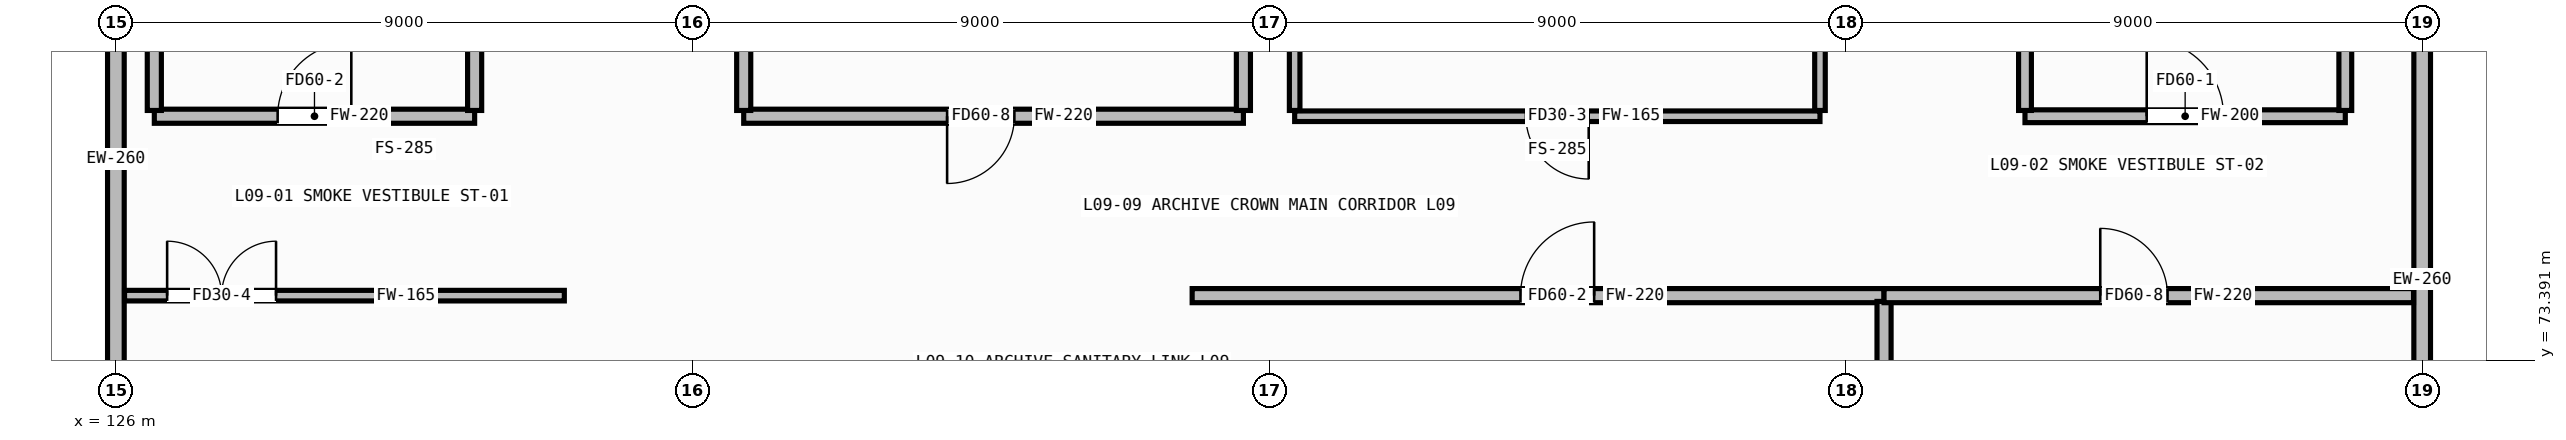
"""IFC4 building model, lengths in metres.
Left out: names, types, materials, properties, quantities, classifications, styles, units other than length and angle.
Written with IfcOpenShell. Run it as: python <this file> out.ifc"""

import sys

from ifc_helpers import new_model, si_unit, direction, frame, frame_2d, origin, place, context, subcontext, project, spatial, rectangle, extrude, element, fill, save


model = new_model("IFC4")
c1 = context("Model", 3, precision=1e-05, world=origin(), true_north=direction((0.0, 1.0)))
c2 = subcontext(c1, "Body", "Model", "MODEL_VIEW")
j1 = project(units=[si_unit("LENGTHUNIT", "METRE"), si_unit("PLANEANGLEUNIT", "RADIAN")], contexts=[c1])
p1 = place(None, origin())
s1 = spatial("IfcSite", under=j1, at=p1, CompositionType="ELEMENT")
p2 = place(p1, origin())
s2 = spatial("IfcBuilding", under=s1, at=p2, CompositionType="ELEMENT")
p3 = place(p2, frame((0.0, 0.0, 31.4)))
s3 = spatial("IfcBuildingStorey", under=s2, at=p3, CompositionType="ELEMENT", Elevation=31.4)
p4 = place(p3, frame((126.0, 72.25, 0.0), z_axis=(0.0, 0.0, 1.0), x_axis=(0.0, 1.0, 0.0)))
e1 = element("IfcWall", 1, at=p4, inside=s3, PredefinedType="STANDARD", context=c2, shape_type="SweptSolid", body=[
    extrude(rectangle(XDim=6.7, YDim=0.26, at=frame_2d((3.35, 0.0))), origin(), (0.0, 0.0, 1.0), 3.16),
])
p5 = place(p3, frame((162.0, 78.975, 0.0), z_axis=(0.0, 0.0, 1.0), x_axis=(0.0, -1.0, 0.0)))
e2 = element("IfcWall", 2, at=p5, inside=s3, PredefinedType="STANDARD", context=c2, shape_type="SweptSolid", body=[
    extrude(rectangle(XDim=6.75, YDim=0.26, at=frame_2d((3.375, 0.0))), origin(), (0.0, 0.0, 1.0), 3.16),
])
p6 = place(p3, frame((126.6, 77.2, 0.0), z_axis=(0.0, 0.0, 1.0), x_axis=(1.0, 0.0, 0.0)))
e3 = element("IfcWall", 3, at=p6, inside=s3, PredefinedType="PARTITIONING", context=c2, shape_type="SweptSolid", body=[
    extrude(rectangle(XDim=5.0, YDim=0.22, at=frame_2d((2.5, 0.0))), origin(), (0.0, 0.0, 1.0), 3.56),
])
p7 = place(p6, frame((1.925, 0.0, 0.0)))
e4 = element("IfcOpeningElement", 4, at=p7, cuts=e3, PredefinedType="OPENING", context=c2, shape_type="SweptSolid", body=[
    extrude(rectangle(XDim=1.15, YDim=2.1, at=frame_2d((0.575, 1.05))), frame((0.0, 0.122, 0.0), z_axis=(0.0, -1.0, 0.0), x_axis=(1.0, 0.0, 0.0)), (0.0, 0.0, 1.0), 0.244),
])
for number, where, z_axis, x_axis in (
    (5, (126.6, 77.29, 0.0), (0.0, 0.0, 1.0), (0.0, 1.0, 0.0)),
    (6, (131.6, 77.29, 0.0), (0.0, 0.0, 1.0), (0.0, 1.0, 0.0)),
):
    element("IfcWall", number, at=place(p3, frame(where, z_axis=z_axis, x_axis=x_axis)), inside=s3, PredefinedType="PARTITIONING", context=c2, shape_type="SweptSolid", body=[
        extrude(rectangle(XDim=3.82, YDim=0.22, at=frame_2d((1.91, 0.0))), origin(), (0.0, 0.0, 1.0), 3.56),
    ])
p8 = place(p3, frame((155.8, 77.2, 0.0), z_axis=(0.0, 0.0, 1.0), x_axis=(1.0, 0.0, 0.0)))
e7 = element("IfcWall", 7, at=p8, inside=s3, PredefinedType="PARTITIONING", context=c2, shape_type="SweptSolid", body=[
    extrude(rectangle(XDim=5.0, YDim=0.2, at=frame_2d((2.5, 0.0))), origin(), (0.0, 0.0, 1.0), 3.56),
])
p9 = place(p8, frame((1.9, 0.0, 0.0)))
e8 = element("IfcOpeningElement", 8, at=p9, cuts=e7, PredefinedType="OPENING", context=c2, shape_type="SweptSolid", body=[
    extrude(rectangle(XDim=1.2, YDim=2.1, at=frame_2d((0.6, 1.05))), frame((0.0, 0.112, 0.0), z_axis=(0.0, -1.0, 0.0), x_axis=(1.0, 0.0, 0.0)), (0.0, 0.0, 1.0), 0.224),
])
for number, where, z_axis, x_axis in (
    (9, (155.8, 77.29, 0.0), (0.0, 0.0, 1.0), (0.0, 1.0, 0.0)),
    (10, (160.8, 77.29, 0.0), (0.0, 0.0, 1.0), (0.0, 1.0, 0.0)),
):
    element("IfcWall", number, at=place(p3, frame(where, z_axis=z_axis, x_axis=x_axis)), inside=s3, PredefinedType="PARTITIONING", context=c2, shape_type="SweptSolid", body=[
        extrude(rectangle(XDim=3.82, YDim=0.2, at=frame_2d((1.91, 0.0))), origin(), (0.0, 0.0, 1.0), 3.56),
    ])
p10 = place(p3, frame((135.8, 77.2, 0.0), z_axis=(0.0, 0.0, 1.0), x_axis=(1.0, 0.0, 0.0)))
e11 = element("IfcWall", 11, at=p10, inside=s3, PredefinedType="PARTITIONING", context=c2, shape_type="SweptSolid", body=[
    extrude(rectangle(XDim=7.8, YDim=0.22, at=frame_2d((3.9, 0.0))), origin(), (0.0, 0.0, 1.0), 3.56),
])
p11 = place(p10, frame((3.175, 0.0, 0.0)))
e12 = element("IfcOpeningElement", 12, at=p11, cuts=e11, PredefinedType="OPENING", context=c2, shape_type="SweptSolid", body=[
    extrude(rectangle(XDim=1.05, YDim=2.02, at=frame_2d((0.525, 1.01))), frame((0.0, 0.122, 0.0), z_axis=(0.0, -1.0, 0.0), x_axis=(1.0, 0.0, 0.0)), (0.0, 0.0, 1.0), 0.244),
])
for number, where, z_axis, x_axis in (
    (13, (135.8, 77.29, 0.0), (0.0, 0.0, 1.0), (0.0, 1.0, 0.0)),
    (14, (143.6, 77.29, 0.0), (0.0, 0.0, 1.0), (0.0, 1.0, 0.0)),
):
    element("IfcWall", number, at=place(p3, frame(where, z_axis=z_axis, x_axis=x_axis)), inside=s3, PredefinedType="PARTITIONING", context=c2, shape_type="SweptSolid", body=[
        extrude(rectangle(XDim=3.82, YDim=0.22, at=frame_2d((1.91, 0.0))), origin(), (0.0, 0.0, 1.0), 3.56),
    ])
p12 = place(p3, frame((144.4, 77.2, 0.0), z_axis=(0.0, 0.0, 1.0), x_axis=(1.0, 0.0, 0.0)))
e15 = element("IfcWall", 15, at=p12, inside=s3, PredefinedType="PARTITIONING", context=c2, shape_type="SweptSolid", body=[
    extrude(rectangle(XDim=8.2, YDim=0.165, at=frame_2d((4.1, 0.0))), origin(), (0.0, 0.0, 1.0), 3.56),
])
p13 = place(p12, frame((3.61, 0.0, 0.0)))
e16 = element("IfcOpeningElement", 16, at=p13, cuts=e15, PredefinedType="OPENING", context=c2, shape_type="SweptSolid", body=[
    extrude(rectangle(XDim=0.98, YDim=2.02, at=frame_2d((0.49, 1.01))), frame((0.0, 0.094, 0.0), z_axis=(0.0, -1.0, 0.0), x_axis=(1.0, 0.0, 0.0)), (0.0, 0.0, 1.0), 0.189),
])
for number, where, z_axis, x_axis in (
    (17, (144.4, 77.29, 0.0), (0.0, 0.0, 1.0), (0.0, 1.0, 0.0)),
    (18, (152.6, 77.29, 0.0), (0.0, 0.0, 1.0), (0.0, 1.0, 0.0)),
):
    element("IfcWall", number, at=place(p3, frame(where, z_axis=z_axis, x_axis=x_axis)), inside=s3, PredefinedType="PARTITIONING", context=c2, shape_type="SweptSolid", body=[
        extrude(rectangle(XDim=3.82, YDim=0.165, at=frame_2d((1.91, 0.0))), origin(), (0.0, 0.0, 1.0), 3.56),
    ])
p14 = place(p3, frame((126.135, 74.4, 0.0), z_axis=(0.0, 0.0, 1.0), x_axis=(1.0, 0.0, 0.0)))
e19 = element("IfcWall", 19, at=p14, inside=s3, PredefinedType="PARTITIONING", context=c2, shape_type="SweptSolid", body=[
    extrude(rectangle(XDim=6.865, YDim=0.165, at=frame_2d((3.433, 0.0))), origin(), (0.0, 0.0, 1.0), 3.56),
])
p15 = place(p14, frame((0.665, 0.0, 0.0)))
e20 = element("IfcOpeningElement", 20, at=p15, cuts=e19, PredefinedType="OPENING", context=c2, shape_type="SweptSolid", body=[
    extrude(rectangle(XDim=1.7, YDim=2.12, at=frame_2d((0.85, 1.06))), frame((0.0, 0.094, 0.0), z_axis=(0.0, -1.0, 0.0), x_axis=(1.0, 0.0, 0.0)), (0.0, 0.0, 1.0), 0.189),
])
p16 = place(p3, frame((142.8, 74.4, 0.0), z_axis=(0.0, 0.0, 1.0), x_axis=(1.0, 0.0, 0.0)))
e21 = element("IfcWall", 21, at=p16, inside=s3, PredefinedType="PARTITIONING", context=c2, shape_type="SweptSolid", body=[
    extrude(rectangle(XDim=10.8, YDim=0.22, at=frame_2d((5.4, 0.0))), origin(), (0.0, 0.0, 1.0), 3.56),
])
p17 = place(p16, frame((5.125, 0.0, 0.0)))
e22 = element("IfcOpeningElement", 22, at=p17, cuts=e21, PredefinedType="OPENING", context=c2, shape_type="SweptSolid", body=[
    extrude(rectangle(XDim=1.15, YDim=2.1, at=frame_2d((0.575, 1.05))), frame((0.0, 0.122, 0.0), z_axis=(0.0, -1.0, 0.0), x_axis=(1.0, 0.0, 0.0)), (0.0, 0.0, 1.0), 0.244),
])
p18 = place(p3, frame((153.6, 57.735, 0.0), z_axis=(0.0, 0.0, 1.0), x_axis=(0.0, 1.0, 0.0)))
e23 = element("IfcWall", 23, at=p18, inside=s3, PredefinedType="PARTITIONING", context=c2, shape_type="SweptSolid", body=[
    extrude(rectangle(XDim=16.575, YDim=0.22, at=frame_2d((8.288, 0.0))), origin(), (0.0, 0.0, 1.0), 3.56),
])
p19 = place(p3, frame((153.6, 74.4, 0.0), z_axis=(0.0, 0.0, 1.0), x_axis=(1.0, 0.0, 0.0)))
e24 = element("IfcWall", 24, at=p19, inside=s3, PredefinedType="PARTITIONING", context=c2, shape_type="SweptSolid", body=[
    extrude(rectangle(XDim=8.265, YDim=0.22, at=frame_2d((4.132, 0.0))), origin(), (0.0, 0.0, 1.0), 3.56),
])
p20 = place(p19, frame((3.375, 0.0, 0.0)))
e25 = element("IfcOpeningElement", 25, at=p20, cuts=e24, PredefinedType="OPENING", context=c2, shape_type="SweptSolid", body=[
    extrude(rectangle(XDim=1.05, YDim=2.02, at=frame_2d((0.525, 1.01))), frame((0.0, 0.122, 0.0), z_axis=(0.0, -1.0, 0.0), x_axis=(1.0, 0.0, 0.0)), (0.0, 0.0, 1.0), 0.244),
])
p21 = place(p7, origin())
e26 = element("IfcDoor", 26, at=p21, inside=s3, OperationType="SINGLE_SWING_RIGHT", PredefinedType="DOOR", context=c2, shape_type="SweptSolid", body=[
    extrude(rectangle(XDim=1.15, YDim=2.1, at=frame_2d((0.575, 1.05))), frame((0.0, 0.025, 0.0), z_axis=(0.0, -1.0, 0.0), x_axis=(1.0, 0.0, 0.0)), (0.0, 0.0, 1.0), 0.05),
])
fill(e4, e26)
p22 = place(p9, origin())
e27 = element("IfcDoor", 27, at=p22, inside=s3, OperationType="SINGLE_SWING_LEFT", PredefinedType="DOOR", context=c2, shape_type="SweptSolid", body=[
    extrude(rectangle(XDim=1.2, YDim=2.1, at=frame_2d((0.6, 1.05))), frame((0.0, 0.025, 0.0), z_axis=(0.0, -1.0, 0.0), x_axis=(1.0, 0.0, 0.0)), (0.0, 0.0, 1.0), 0.05),
])
fill(e8, e27)
p23 = place(p11, frame((1.05, 0.0, 0.0), z_axis=(0.0, 0.0, 1.0), x_axis=(-1.0, 0.0, 0.0)))
e28 = element("IfcDoor", 28, at=p23, inside=s3, OperationType="SINGLE_SWING_RIGHT", PredefinedType="DOOR", context=c2, shape_type="SweptSolid", body=[
    extrude(rectangle(XDim=1.05, YDim=2.02, at=frame_2d((0.525, 1.01))), frame((0.0, 0.025, 0.0), z_axis=(0.0, -1.0, 0.0), x_axis=(1.0, 0.0, 0.0)), (0.0, 0.0, 1.0), 0.05),
])
fill(e12, e28)
p24 = place(p13, frame((0.98, 0.0, 0.0), z_axis=(0.0, 0.0, 1.0), x_axis=(-1.0, 0.0, 0.0)))
e29 = element("IfcDoor", 29, at=p24, inside=s3, OperationType="SINGLE_SWING_LEFT", PredefinedType="DOOR", context=c2, shape_type="SweptSolid", body=[
    extrude(rectangle(XDim=0.98, YDim=2.02, at=frame_2d((0.49, 1.01))), frame((0.0, 0.025, 0.0), z_axis=(0.0, -1.0, 0.0), x_axis=(1.0, 0.0, 0.0)), (0.0, 0.0, 1.0), 0.05),
])
fill(e16, e29)
p25 = place(p15, origin())
e30 = element("IfcDoor", 30, at=p25, inside=s3, OperationType="DOUBLE_DOOR_SINGLE_SWING", PredefinedType="DOOR", context=c2, shape_type="SweptSolid", body=[
    extrude(rectangle(XDim=1.7, YDim=2.12, at=frame_2d((0.85, 1.06))), frame((0.0, 0.025, 0.0), z_axis=(0.0, -1.0, 0.0), x_axis=(1.0, 0.0, 0.0)), (0.0, 0.0, 1.0), 0.05),
])
fill(e20, e30)
p26 = place(p17, origin())
e31 = element("IfcDoor", 31, at=p26, inside=s3, OperationType="SINGLE_SWING_RIGHT", PredefinedType="DOOR", context=c2, shape_type="SweptSolid", body=[
    extrude(rectangle(XDim=1.15, YDim=2.1, at=frame_2d((0.575, 1.05))), frame((0.0, 0.025, 0.0), z_axis=(0.0, -1.0, 0.0), x_axis=(1.0, 0.0, 0.0)), (0.0, 0.0, 1.0), 0.05),
])
fill(e22, e31)
p27 = place(p20, origin())
e32 = element("IfcDoor", 32, at=p27, inside=s3, OperationType="SINGLE_SWING_LEFT", PredefinedType="DOOR", context=c2, shape_type="SweptSolid", body=[
    extrude(rectangle(XDim=1.05, YDim=2.02, at=frame_2d((0.525, 1.01))), frame((0.0, 0.025, 0.0), z_axis=(0.0, -1.0, 0.0), x_axis=(1.0, 0.0, 0.0)), (0.0, 0.0, 1.0), 0.05),
])
fill(e25, e32)
save(model, sys.argv[1])
